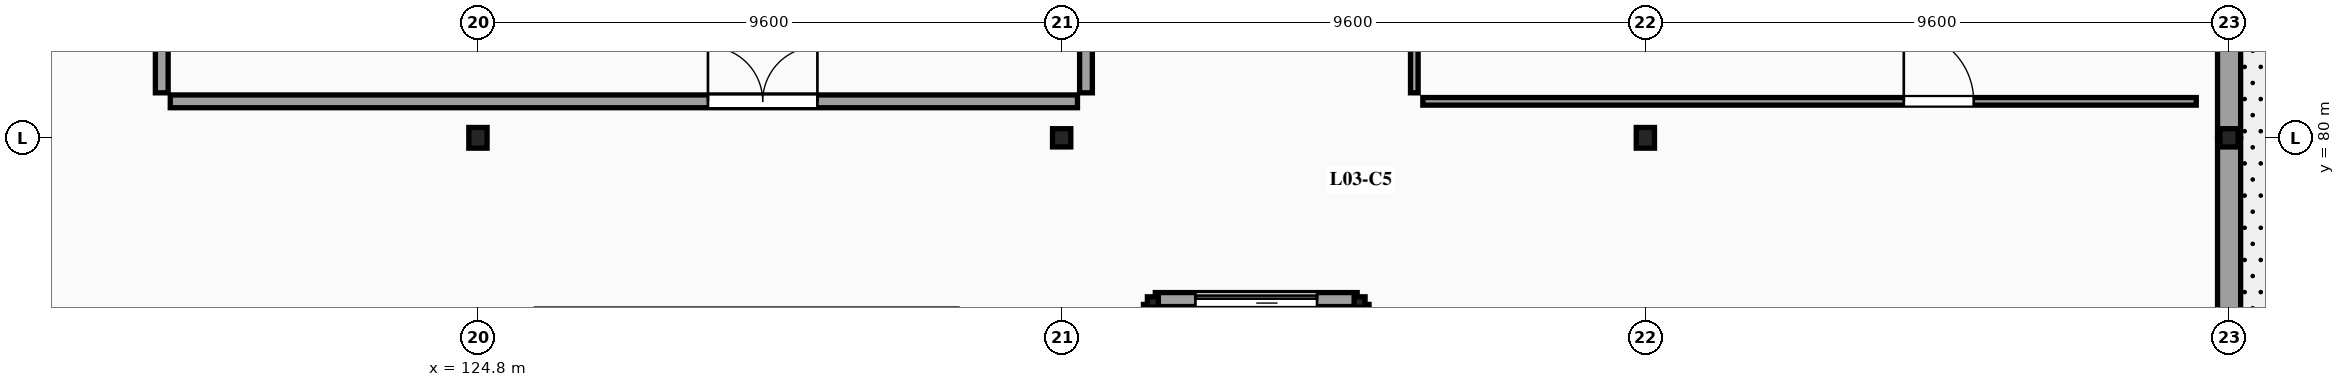
"""IFC4 building model, lengths in metres.
Left out: names, types, materials, properties, quantities, classifications, styles, units other than length and angle.
Written with IfcOpenShell. Run it as: python <this file> out.ifc"""

import sys

from ifc_helpers import new_model, si_unit, direction, frame, frame_2d, origin, origin_2d, place, context, subcontext, project, spatial, rectangle, i_section, extrude, element, fill, save


model = new_model("IFC4")
c1 = context("Model", 3, precision=1e-05, world=origin(), true_north=direction((0.0, 1.0)))
c2 = subcontext(c1, "Body", "Model", "MODEL_VIEW")
j1 = project(units=[si_unit("LENGTHUNIT", "METRE"), si_unit("PLANEANGLEUNIT", "RADIAN")], contexts=[c1])
p1 = place(None, origin())
s1 = spatial("IfcSite", under=j1, at=p1, CompositionType="ELEMENT")
p2 = place(p1, origin())
s2 = spatial("IfcBuilding", under=s1, at=p2, CompositionType="ELEMENT")
p3 = place(p2, frame((0.0, 0.0, 12.9)))
s3 = spatial("IfcBuildingStorey", under=s2, at=p3, CompositionType="ELEMENT", Elevation=12.9)
p4 = place(p3, frame((124.8, 80.0, -0.26), z_axis=(0.0, 0.0, 1.0), x_axis=(1.0, 0.0, 0.0)))
e1 = element("IfcColumn", 1, at=p4, inside=s3, PredefinedType="COLUMN", context=c2, shape_type="SweptSolid", body=[
    extrude(i_section(OverallWidth=0.3, OverallDepth=0.34, WebThickness=0.012, FlangeThickness=0.021, FilletRadius=0.027, at=origin_2d()), origin(), (0.0, 0.0, 1.0), 4.48),
])
p5 = place(p3, frame((134.4, 80.0, -0.26), z_axis=(0.0, 0.0, 1.0), x_axis=(1.0, 0.0, 0.0)))
e2 = element("IfcColumn", 2, at=p5, inside=s3, PredefinedType="COLUMN", context=c2, shape_type="SweptSolid", body=[
    extrude(i_section(OverallWidth=0.3, OverallDepth=0.3, WebThickness=0.011, FlangeThickness=0.019, FilletRadius=0.027, at=origin_2d()), origin(), (0.0, 0.0, 1.0), 4.48),
])
p6 = place(p3, frame((144.0, 80.0, -0.26), z_axis=(0.0, 0.0, 1.0), x_axis=(1.0, 0.0, 0.0)))
e3 = element("IfcColumn", 3, at=p6, inside=s3, PredefinedType="COLUMN", context=c2, shape_type="SweptSolid", body=[
    extrude(i_section(OverallWidth=0.3, OverallDepth=0.34, WebThickness=0.012, FlangeThickness=0.021, FilletRadius=0.027, at=origin_2d()), origin(), (0.0, 0.0, 1.0), 4.48),
])
p7 = place(p3, frame((153.6, 80.0, -0.26), z_axis=(0.0, 0.0, 1.0), x_axis=(1.0, 0.0, 0.0)))
e4 = element("IfcColumn", 4, at=p7, inside=s3, PredefinedType="COLUMN", context=c2, shape_type="SweptSolid", body=[
    extrude(i_section(OverallWidth=0.3, OverallDepth=0.3, WebThickness=0.011, FlangeThickness=0.019, FilletRadius=0.027, at=origin_2d()), origin(), (0.0, 0.0, 1.0), 4.48),
])
for number, where, z_axis, x_axis in (
    (5, (139.3, 77.3, 0.0), (0.0, 0.0, 1.0), (1.0, 0.0, 0.0)),
    (6, (135.9, 77.3, 0.0), (0.0, 0.0, 1.0), (1.0, 0.0, 0.0)),
):
    element("IfcColumn", number, at=place(p3, frame(where, z_axis=z_axis, x_axis=x_axis)), inside=s3, PredefinedType="COLUMN", context=c2, shape_type="SweptSolid", body=[
        extrude(i_section(OverallWidth=0.18, OverallDepth=0.171, WebThickness=0.006, FlangeThickness=0.01, FilletRadius=0.015, at=origin_2d()), origin(), (0.0, 0.0, 1.0), 4.5),
    ])
p8 = place(p3, frame((153.6, 72.02, 0.0), z_axis=(0.0, 0.0, 1.0), x_axis=(0.0, 1.0, 0.0)))
e7 = element("IfcWall", 7, at=p8, inside=s3, PredefinedType="SOLIDWALL", context=c2, shape_type="SweptSolid", body=[
    extrude(rectangle(XDim=7.96, YDim=0.38, at=frame_2d((3.98, 0.0))), origin(), (0.0, 0.0, 1.0), 3.54),
])
p9 = place(p8, frame((2.8, 0.0, 0.0)))
e8 = element("IfcOpeningElement", 8, at=p9, cuts=e7, PredefinedType="OPENING", context=c2, shape_type="SweptSolid", body=[
    extrude(rectangle(XDim=1.35, YDim=2.2, at=frame_2d((0.675, 1.1))), frame((0.0, 0.2, 0.0), z_axis=(0.0, -1.0, 0.0), x_axis=(1.0, 0.0, 0.0)), (0.0, 0.0, 1.0), 0.4),
])
p10 = place(p3, frame((153.6, 80.02, 0.0), z_axis=(0.0, 0.0, 1.0), x_axis=(0.0, 1.0, 0.0)))
e9 = element("IfcWall", 9, at=p10, inside=s3, PredefinedType="SOLIDWALL", context=c2, shape_type="SweptSolid", body=[
    extrude(rectangle(XDim=7.96, YDim=0.38, at=frame_2d((3.98, 0.0))), origin(), (0.0, 0.0, 1.0), 3.54),
])
p11 = place(p10, frame((4.9, 0.0, 0.9)))
e10 = element("IfcOpeningElement", 10, at=p11, cuts=e9, PredefinedType="OPENING", context=c2, shape_type="SweptSolid", body=[
    extrude(rectangle(XDim=1.6, YDim=2.0, at=frame_2d((0.8, 1.0))), frame((0.0, 0.2, 0.0), z_axis=(0.0, -1.0, 0.0), x_axis=(1.0, 0.0, 0.0)), (0.0, 0.0, 1.0), 0.4),
])
p12 = place(p3, frame((135.94, 77.34, 0.0), z_axis=(0.0, 0.0, 1.0), x_axis=(1.0, 0.0, 0.0)))
e11 = element("IfcWall", 11, at=p12, inside=s3, PredefinedType="SOLIDWALL", context=c2, shape_type="SweptSolid", body=[
    extrude(rectangle(XDim=3.32, YDim=0.23, at=frame_2d((1.66, 0.0))), origin(), (0.0, 0.0, 1.0), 3.38),
])
p13 = place(p12, frame((0.66, 0.0, 0.0)))
e12 = element("IfcOpeningElement", 12, at=p13, cuts=e11, PredefinedType="OPENING", context=c2, shape_type="SweptSolid", body=[
    extrude(rectangle(XDim=2.0, YDim=2.5, at=frame_2d((1.0, 1.25))), frame((0.0, 0.125, 0.0), z_axis=(0.0, -1.0, 0.0), x_axis=(1.0, 0.0, 0.0)), (0.0, 0.0, 1.0), 0.25),
])
for number, where, z_axis, x_axis in (
    (13, (135.86, 73.14, 0.0), (0.0, 0.0, 1.0), (0.0, 1.0, 0.0)),
    (14, (139.34, 73.14, 0.0), (0.0, 0.0, 1.0), (0.0, 1.0, 0.0)),
):
    element("IfcWall", number, at=place(p3, frame(where, z_axis=z_axis, x_axis=x_axis)), inside=s3, PredefinedType="SOLIDWALL", context=c2, shape_type="SweptSolid", body=[
        extrude(rectangle(XDim=4.12, YDim=0.23, at=frame_2d((2.06, 0.0))), origin(), (0.0, 0.0, 1.0), 3.38),
    ])
p14 = place(p3, frame((119.74, 80.6, 0.0), z_axis=(0.0, 0.0, 1.0), x_axis=(1.0, 0.0, 0.0)))
e15 = element("IfcWall", 15, at=p14, inside=s3, PredefinedType="SOLIDWALL", context=c2, shape_type="SweptSolid", body=[
    extrude(rectangle(XDim=14.92, YDim=0.21, at=frame_2d((7.46, 0.0))), origin(), (0.0, 0.0, 1.0), 3.38),
])
p15 = place(p14, frame((8.843, 0.0, 0.0)))
e16 = element("IfcOpeningElement", 16, at=p15, cuts=e15, PredefinedType="OPENING", context=c2, shape_type="SweptSolid", body=[
    extrude(rectangle(XDim=1.8, YDim=2.4, at=frame_2d((0.9, 1.2))), frame((0.0, 0.115, 0.0), z_axis=(0.0, -1.0, 0.0), x_axis=(1.0, 0.0, 0.0)), (0.0, 0.0, 1.0), 0.23),
])
for number, where, z_axis, x_axis in (
    (17, (119.6, 80.74, 0.0), (0.0, 0.0, 1.0), (0.0, 1.0, 0.0)),
    (18, (134.8, 80.74, 0.0), (0.0, 0.0, 1.0), (0.0, 1.0, 0.0)),
):
    element("IfcWall", number, at=place(p3, frame(where, z_axis=z_axis, x_axis=x_axis)), inside=s3, PredefinedType="SOLIDWALL", context=c2, shape_type="SweptSolid", body=[
        extrude(rectangle(XDim=15.09, YDim=0.21, at=frame_2d((7.545, 0.0))), origin(), (0.0, 0.0, 1.0), 3.38),
    ])
p16 = place(p3, frame((140.34, 80.6, 0.0), z_axis=(0.0, 0.0, 1.0), x_axis=(1.0, 0.0, 0.0)))
e19 = element("IfcWall", 19, at=p16, inside=s3, PredefinedType="PARTITIONING", context=c2, shape_type="SweptSolid", body=[
    extrude(rectangle(XDim=12.72, YDim=0.125, at=frame_2d((6.36, 0.0))), origin(), (0.0, 0.0, 1.0), 3.38),
])
p17 = place(p16, frame((7.91, 0.0, 0.0)))
e20 = element("IfcOpeningElement", 20, at=p17, cuts=e19, PredefinedType="OPENING", context=c2, shape_type="SweptSolid", body=[
    extrude(rectangle(XDim=1.15, YDim=2.2, at=frame_2d((0.575, 1.1))), frame((0.0, 0.073, 0.0), z_axis=(0.0, -1.0, 0.0), x_axis=(1.0, 0.0, 0.0)), (0.0, 0.0, 1.0), 0.145),
])
p18 = place(p3, frame((140.2, 80.74, 0.0), z_axis=(0.0, 0.0, 1.0), x_axis=(0.0, 1.0, 0.0)))
e21 = element("IfcWall", 21, at=p18, inside=s3, PredefinedType="PARTITIONING", context=c2, shape_type="SweptSolid", body=[
    extrude(rectangle(XDim=15.09, YDim=0.125, at=frame_2d((7.545, 0.0))), origin(), (0.0, 0.0, 1.0), 3.38),
])
p19 = place(p13, origin())
e22 = element("IfcDoor", 22, at=p19, inside=s3, OperationType="SLIDING_TO_RIGHT", PredefinedType="DOOR", context=c2, shape_type="SweptSolid", body=[
    extrude(rectangle(XDim=2.0, YDim=2.5, at=frame_2d((1.0, 1.25))), frame((0.0, 0.025, 0.0), z_axis=(0.0, -1.0, 0.0), x_axis=(1.0, 0.0, 0.0)), (0.0, 0.0, 1.0), 0.05),
])
fill(e12, e22)
p20 = place(p15, origin())
e23 = element("IfcDoor", 23, at=p20, inside=s3, OperationType="DOUBLE_DOOR_SINGLE_SWING", PredefinedType="DOOR", context=c2, shape_type="SweptSolid", body=[
    extrude(rectangle(XDim=1.8, YDim=2.4, at=frame_2d((0.9, 1.2))), frame((0.0, 0.025, 0.0), z_axis=(0.0, -1.0, 0.0), x_axis=(1.0, 0.0, 0.0)), (0.0, 0.0, 1.0), 0.05),
])
fill(e16, e23)
p21 = place(p17, origin())
e24 = element("IfcDoor", 24, at=p21, inside=s3, OperationType="SINGLE_SWING_LEFT", PredefinedType="DOOR", context=c2, shape_type="SweptSolid", body=[
    extrude(rectangle(XDim=1.15, YDim=2.2, at=frame_2d((0.575, 1.1))), frame((0.0, 0.025, 0.0), z_axis=(0.0, -1.0, 0.0), x_axis=(1.0, 0.0, 0.0)), (0.0, 0.0, 1.0), 0.05),
])
fill(e20, e24)
save(model, sys.argv[1])
